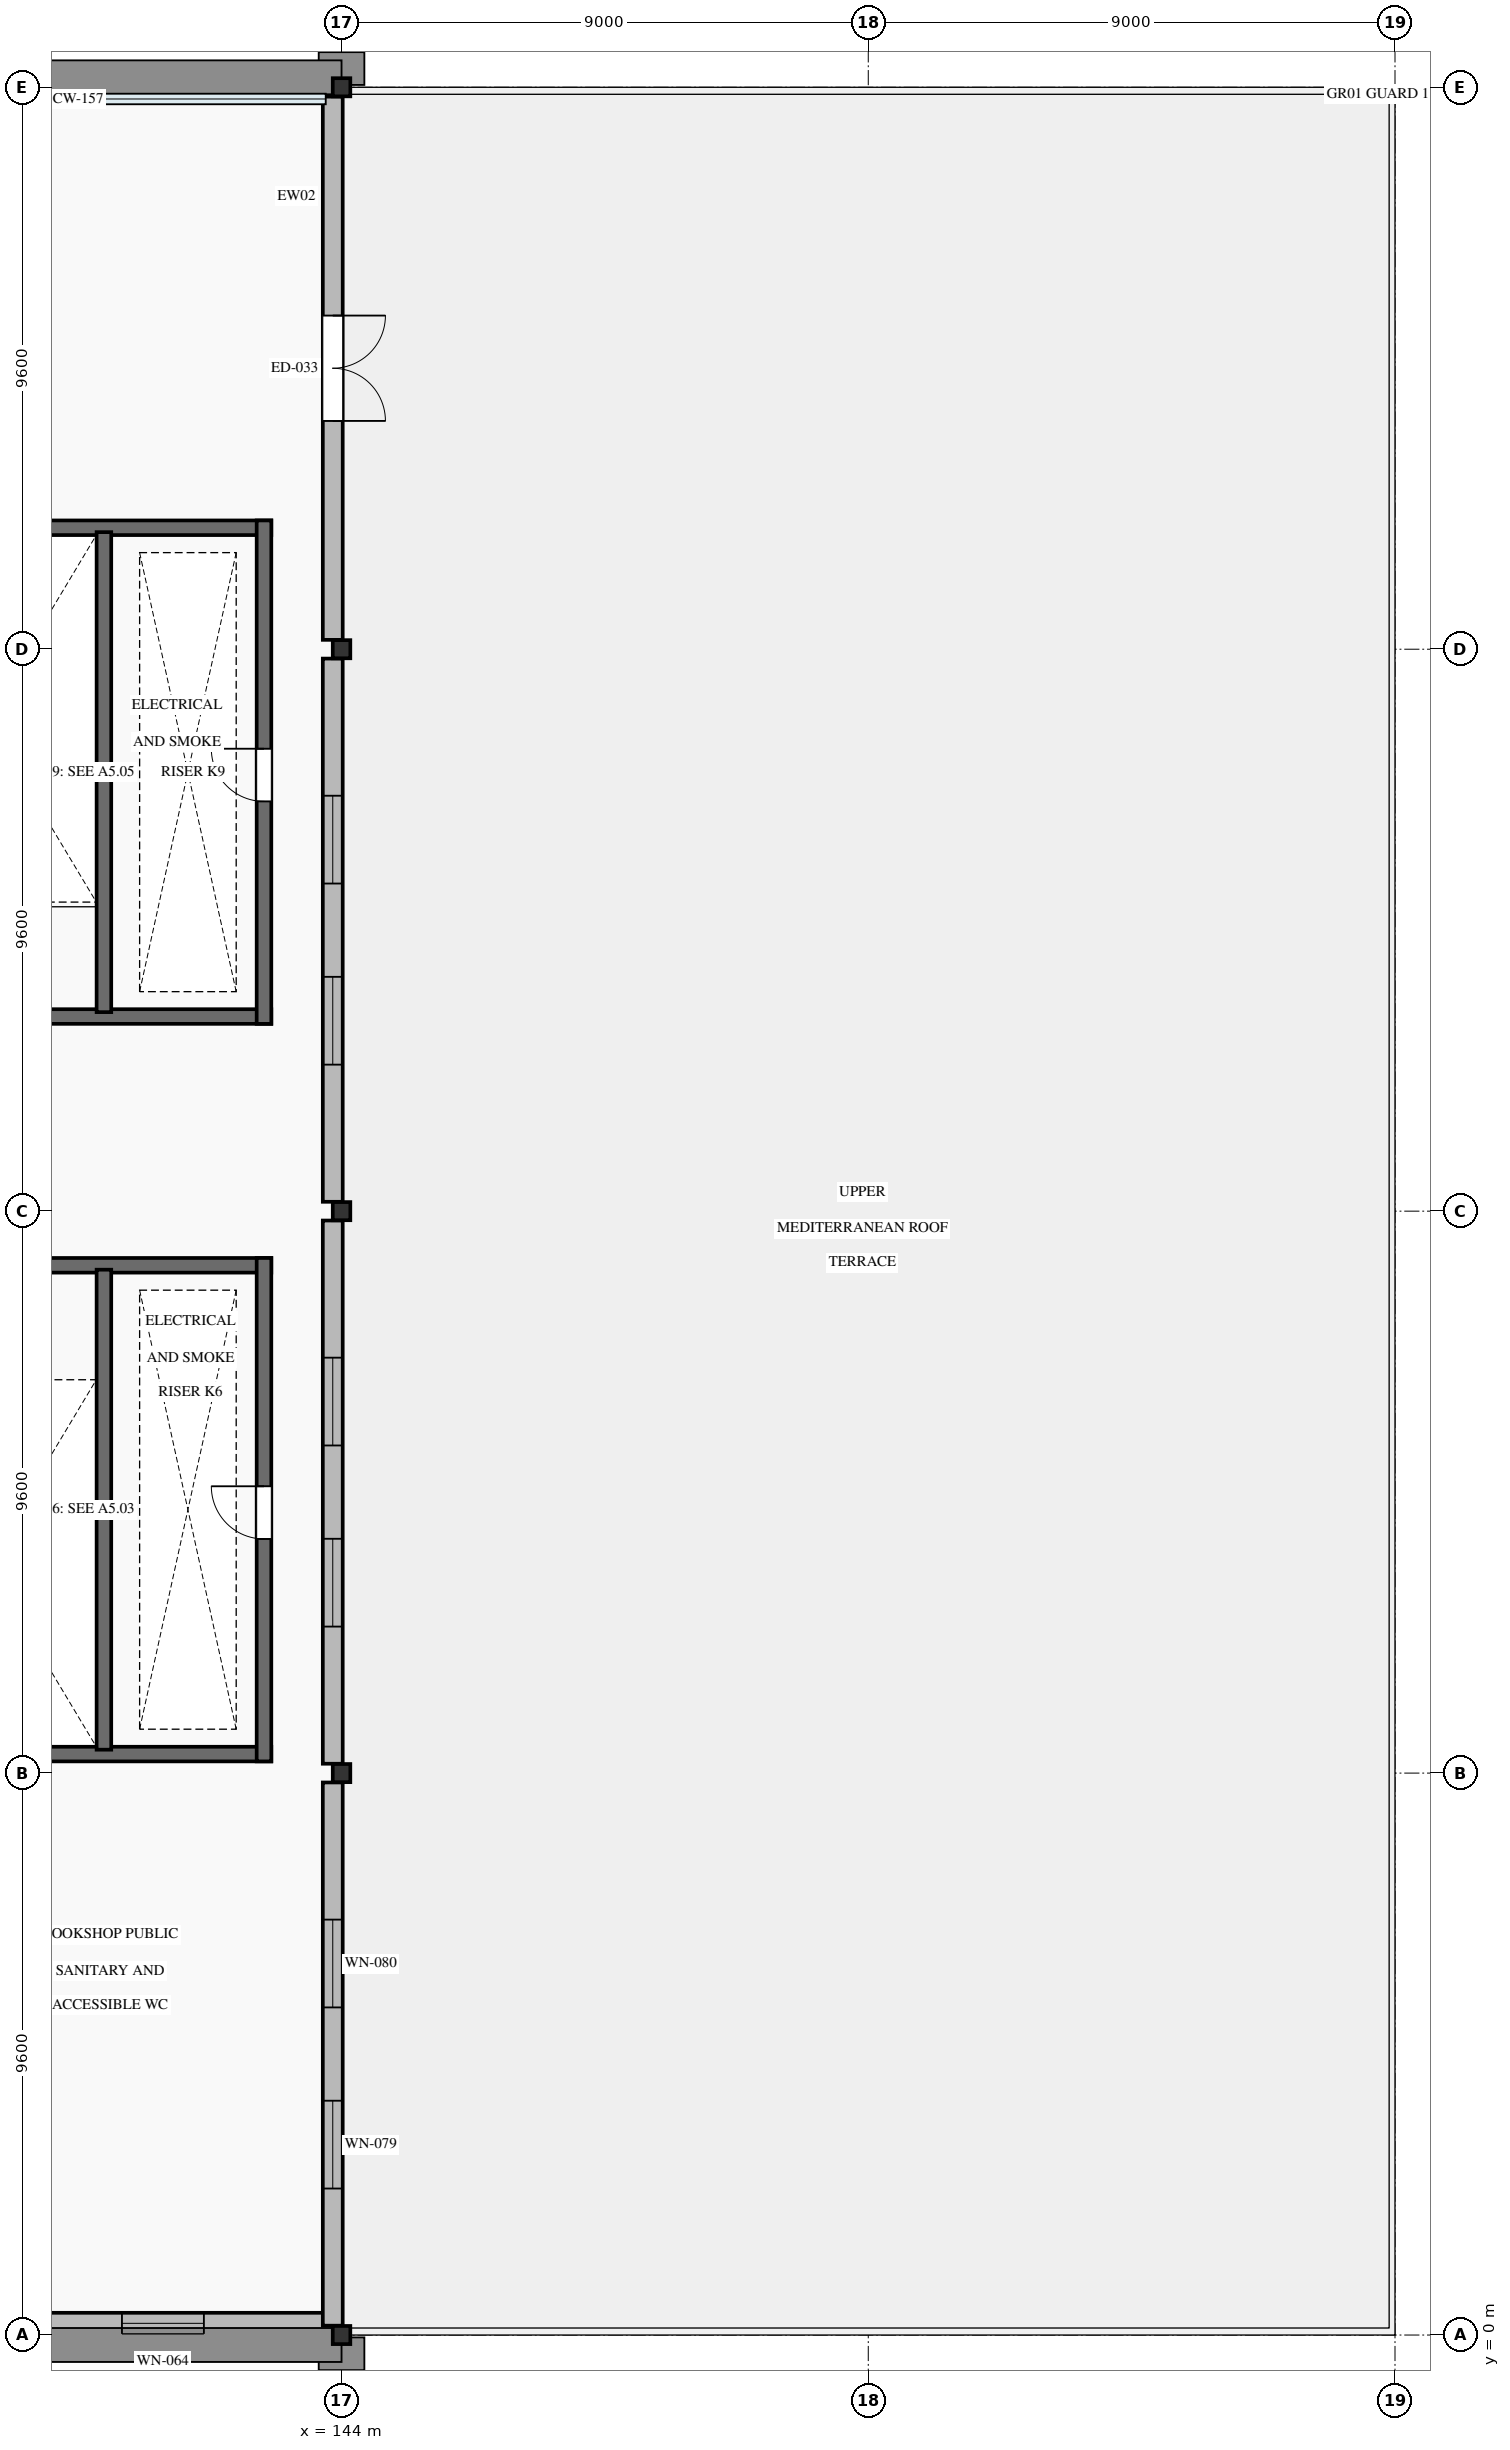
"""IFC4 building model, lengths in metres.
Left out: names, types, materials, properties, quantities, classifications, styles, units other than length and angle.
Written with IfcOpenShell. Run it as: python <this file> out.ifc"""

import sys

from ifc_helpers import new_model, si_unit, direction, frame, frame_2d, origin, origin_2d, place, context, subcontext, project, spatial, rectangle, i_section, extrude, element, fill, save


model = new_model("IFC4")
c1 = context("Model", 3, precision=1e-05, world=origin(), true_north=direction((0.0, 1.0)))
c2 = subcontext(c1, "Body", "Model", "MODEL_VIEW")
j1 = project(units=[si_unit("LENGTHUNIT", "METRE"), si_unit("PLANEANGLEUNIT", "RADIAN")], contexts=[c1])
p1 = place(None, origin())
s1 = spatial("IfcSite", under=j1, at=p1, CompositionType="ELEMENT")
p2 = place(p1, origin())
s2 = spatial("IfcBuilding", under=s1, at=p2, CompositionType="ELEMENT")
p3 = place(p2, frame((0.0, 0.0, 15.0)))
s3 = spatial("IfcBuildingStorey", under=s2, at=p3, CompositionType="ELEMENT", Elevation=15.0)
for number, where, z_axis, x_axis in (
    (1, (144.0, 0.0, 0.0), (0.0, 0.0, 1.0), (1.0, 0.0, 0.0)),
    (2, (144.0, 9.6, 0.0), (0.0, 0.0, 1.0), (1.0, 0.0, 0.0)),
    (3, (144.0, 19.2, 0.0), (0.0, 0.0, 1.0), (1.0, 0.0, 0.0)),
    (4, (144.0, 28.8, 0.0), (0.0, 0.0, 1.0), (1.0, 0.0, 0.0)),
    (5, (144.0, 38.4, 0.0), (0.0, 0.0, 1.0), (1.0, 0.0, 0.0)),
):
    element("IfcColumn", number, at=place(p3, frame(where, z_axis=z_axis, x_axis=x_axis)), inside=s3, PredefinedType="COLUMN", context=c2, shape_type="SweptSolid", body=[
        extrude(i_section(OverallWidth=0.3, OverallDepth=0.31, WebThickness=0.009, FlangeThickness=0.015, FilletRadius=0.027, at=origin_2d()), origin(), (0.0, 0.0, 1.0), 3.9),
    ])
p4 = place(p3, frame((135.155, 0.2, 0.0), z_axis=(0.0, 0.0, 1.0), x_axis=(1.0, 0.0, 0.0)))
e6 = element("IfcWall", 6, at=p4, inside=s3, PredefinedType="SOLIDWALL", context=c2, shape_type="SweptSolid", body=[
    extrude(rectangle(XDim=8.69, YDim=0.36, at=frame_2d((4.345, 0.0))), origin(), (0.0, 0.0, 1.0), 3.355),
])
p5 = place(p4, frame((2.197, 0.0, 0.95)))
e7 = element("IfcOpeningElement", 7, at=p5, cuts=e6, PredefinedType="OPENING", context=c2, shape_type="SweptSolid", body=[
    extrude(rectangle(XDim=1.4, YDim=2.0, at=frame_2d((0.7, 1.0))), frame((0.0, 0.195, 0.0), z_axis=(0.0, -1.0, 0.0), x_axis=(1.0, 0.0, 0.0)), (0.0, 0.0, 1.0), 0.39),
])
p6 = place(p4, frame((5.093, 0.0, 0.95)))
e8 = element("IfcOpeningElement", 8, at=p6, cuts=e6, PredefinedType="OPENING", context=c2, shape_type="SweptSolid", body=[
    extrude(rectangle(XDim=1.4, YDim=2.0, at=frame_2d((0.7, 1.0))), frame((0.0, 0.195, 0.0), z_axis=(0.0, -1.0, 0.0), x_axis=(1.0, 0.0, 0.0)), (0.0, 0.0, 1.0), 0.39),
])
p7 = place(p3, frame((143.85, 0.16, 0.0), z_axis=(0.0, 0.0, 1.0), x_axis=(0.0, 1.0, 0.0)))
e9 = element("IfcWall", 9, at=p7, inside=s3, PredefinedType="SOLIDWALL", context=c2, shape_type="SweptSolid", body=[
    extrude(rectangle(XDim=9.28, YDim=0.34, at=frame_2d((4.64, 0.0))), origin(), (0.0, 0.0, 1.0), 3.335),
])
p8 = place(p7, frame((2.343, 0.0, 0.95)))
e10 = element("IfcOpeningElement", 10, at=p8, cuts=e9, PredefinedType="OPENING", context=c2, shape_type="SweptSolid", body=[
    extrude(rectangle(XDim=1.5, YDim=2.1, at=frame_2d((0.75, 1.05))), frame((0.0, 0.185, 0.0), z_axis=(0.0, -1.0, 0.0), x_axis=(1.0, 0.0, 0.0)), (0.0, 0.0, 1.0), 0.37),
])
p9 = place(p7, frame((5.437, 0.0, 0.95)))
e11 = element("IfcOpeningElement", 11, at=p9, cuts=e9, PredefinedType="OPENING", context=c2, shape_type="SweptSolid", body=[
    extrude(rectangle(XDim=1.5, YDim=2.1, at=frame_2d((0.75, 1.05))), frame((0.0, 0.185, 0.0), z_axis=(0.0, -1.0, 0.0), x_axis=(1.0, 0.0, 0.0)), (0.0, 0.0, 1.0), 0.37),
])
p10 = place(p3, frame((143.85, 9.76, 0.0), z_axis=(0.0, 0.0, 1.0), x_axis=(0.0, 1.0, 0.0)))
e12 = element("IfcWall", 12, at=p10, inside=s3, PredefinedType="SOLIDWALL", context=c2, shape_type="SweptSolid", body=[
    extrude(rectangle(XDim=9.28, YDim=0.34, at=frame_2d((4.64, 0.0))), origin(), (0.0, 0.0, 1.0), 3.335),
])
p11 = place(p10, frame((2.343, 0.0, 0.95)))
e13 = element("IfcOpeningElement", 13, at=p11, cuts=e12, PredefinedType="OPENING", context=c2, shape_type="SweptSolid", body=[
    extrude(rectangle(XDim=1.5, YDim=2.1, at=frame_2d((0.75, 1.05))), frame((0.0, 0.185, 0.0), z_axis=(0.0, -1.0, 0.0), x_axis=(1.0, 0.0, 0.0)), (0.0, 0.0, 1.0), 0.37),
])
p12 = place(p10, frame((5.437, 0.0, 0.95)))
e14 = element("IfcOpeningElement", 14, at=p12, cuts=e12, PredefinedType="OPENING", context=c2, shape_type="SweptSolid", body=[
    extrude(rectangle(XDim=1.5, YDim=2.1, at=frame_2d((0.75, 1.05))), frame((0.0, 0.185, 0.0), z_axis=(0.0, -1.0, 0.0), x_axis=(1.0, 0.0, 0.0)), (0.0, 0.0, 1.0), 0.37),
])
p13 = place(p3, frame((143.85, 19.36, 0.0), z_axis=(0.0, 0.0, 1.0), x_axis=(0.0, 1.0, 0.0)))
e15 = element("IfcWall", 15, at=p13, inside=s3, PredefinedType="SOLIDWALL", context=c2, shape_type="SweptSolid", body=[
    extrude(rectangle(XDim=9.28, YDim=0.34, at=frame_2d((4.64, 0.0))), origin(), (0.0, 0.0, 1.0), 3.335),
])
p14 = place(p13, frame((2.343, 0.0, 0.95)))
e16 = element("IfcOpeningElement", 16, at=p14, cuts=e15, PredefinedType="OPENING", context=c2, shape_type="SweptSolid", body=[
    extrude(rectangle(XDim=1.5, YDim=2.1, at=frame_2d((0.75, 1.05))), frame((0.0, 0.185, 0.0), z_axis=(0.0, -1.0, 0.0), x_axis=(1.0, 0.0, 0.0)), (0.0, 0.0, 1.0), 0.37),
])
p15 = place(p13, frame((5.437, 0.0, 0.95)))
e17 = element("IfcOpeningElement", 17, at=p15, cuts=e15, PredefinedType="OPENING", context=c2, shape_type="SweptSolid", body=[
    extrude(rectangle(XDim=1.5, YDim=2.1, at=frame_2d((0.75, 1.05))), frame((0.0, 0.185, 0.0), z_axis=(0.0, -1.0, 0.0), x_axis=(1.0, 0.0, 0.0)), (0.0, 0.0, 1.0), 0.37),
])
p16 = place(p3, frame((143.85, 28.96, 0.0), z_axis=(0.0, 0.0, 1.0), x_axis=(0.0, 1.0, 0.0)))
e18 = element("IfcWall", 18, at=p16, inside=s3, PredefinedType="SOLIDWALL", context=c2, shape_type="SweptSolid", body=[
    extrude(rectangle(XDim=9.28, YDim=0.34, at=frame_2d((4.64, 0.0))), origin(), (0.0, 0.0, 1.0), 3.335),
])
p17 = place(p16, frame((3.74, 0.0, 0.0)))
e19 = element("IfcOpeningElement", 19, at=p17, cuts=e18, PredefinedType="OPENING", context=c2, shape_type="SweptSolid", body=[
    extrude(rectangle(XDim=1.8, YDim=2.3, at=frame_2d((0.9, 1.15))), frame((0.0, 0.185, 0.0), z_axis=(0.0, -1.0, 0.0), x_axis=(1.0, 0.0, 0.0)), (0.0, 0.0, 1.0), 0.37),
])
p18 = place(p3, frame((135.8, 9.925, 0.0), z_axis=(0.0, 0.0, 1.0), x_axis=(1.0, 0.0, 0.0)))
e20 = element("IfcWall", 20, at=p18, inside=s3, PredefinedType="SHEAR", context=c2, shape_type="SweptSolid", body=[
    extrude(rectangle(XDim=7.0, YDim=0.25, at=frame_2d((3.5, 0.0))), origin(), (0.0, 0.0, 1.0), 3.9),
])
p19 = place(p3, frame((135.8, 18.275, 0.0), z_axis=(0.0, 0.0, 1.0), x_axis=(1.0, 0.0, 0.0)))
e21 = element("IfcWall", 21, at=p19, inside=s3, PredefinedType="SHEAR", context=c2, shape_type="SweptSolid", body=[
    extrude(rectangle(XDim=7.0, YDim=0.25, at=frame_2d((3.5, 0.0))), origin(), (0.0, 0.0, 1.0), 3.9),
])
p20 = place(p19, frame((1.25, 0.0, 0.0)))
e22 = element("IfcOpeningElement", 22, at=p20, cuts=e21, PredefinedType="OPENING", context=c2, shape_type="SweptSolid", body=[
    extrude(rectangle(XDim=1.2, YDim=2.15, at=frame_2d((0.6, 1.075))), frame((0.0, 0.14, 0.0), z_axis=(0.0, -1.0, 0.0), x_axis=(1.0, 0.0, 0.0)), (0.0, 0.0, 1.0), 0.28),
])
p21 = place(p3, frame((142.675, 9.8, 0.0), z_axis=(0.0, 0.0, 1.0), x_axis=(0.0, 1.0, 0.0)))
e23 = element("IfcWall", 23, at=p21, inside=s3, PredefinedType="SHEAR", context=c2, shape_type="SweptSolid", body=[
    extrude(rectangle(XDim=8.6, YDim=0.25, at=frame_2d((4.3, 0.0))), origin(), (0.0, 0.0, 1.0), 3.9),
])
p22 = place(p21, frame((3.8, 0.0, 0.0)))
e24 = element("IfcOpeningElement", 24, at=p22, cuts=e23, PredefinedType="OPENING", context=c2, shape_type="SweptSolid", body=[
    extrude(rectangle(XDim=0.9, YDim=2.05, at=frame_2d((0.45, 1.025))), frame((0.0, 0.14, 0.0), z_axis=(0.0, -1.0, 0.0), x_axis=(1.0, 0.0, 0.0)), (0.0, 0.0, 1.0), 0.28),
])
p23 = place(p3, frame((139.94, 10.0, 0.0), z_axis=(0.0, 0.0, 1.0), x_axis=(0.0, 1.0, 0.0)))
e25 = element("IfcWall", 25, at=p23, inside=s3, PredefinedType="SHEAR", context=c2, shape_type="SweptSolid", body=[
    extrude(rectangle(XDim=8.2, YDim=0.25, at=frame_2d((4.1, 0.0))), origin(), (0.0, 0.0, 1.0), 3.9),
])
p24 = place(p3, frame((135.8, 22.525, 0.0), z_axis=(0.0, 0.0, 1.0), x_axis=(1.0, 0.0, 0.0)))
e26 = element("IfcWall", 26, at=p24, inside=s3, PredefinedType="SHEAR", context=c2, shape_type="SweptSolid", body=[
    extrude(rectangle(XDim=7.0, YDim=0.25, at=frame_2d((3.5, 0.0))), origin(), (0.0, 0.0, 1.0), 3.9),
])
p25 = place(p24, frame((1.25, 0.0, 0.0)))
e27 = element("IfcOpeningElement", 27, at=p25, cuts=e26, PredefinedType="OPENING", context=c2, shape_type="SweptSolid", body=[
    extrude(rectangle(XDim=1.2, YDim=2.15, at=frame_2d((0.6, 1.075))), frame((0.0, 0.14, 0.0), z_axis=(0.0, -1.0, 0.0), x_axis=(1.0, 0.0, 0.0)), (0.0, 0.0, 1.0), 0.28),
])
p26 = place(p3, frame((135.8, 30.875, 0.0), z_axis=(0.0, 0.0, 1.0), x_axis=(1.0, 0.0, 0.0)))
e28 = element("IfcWall", 28, at=p26, inside=s3, PredefinedType="SHEAR", context=c2, shape_type="SweptSolid", body=[
    extrude(rectangle(XDim=7.0, YDim=0.25, at=frame_2d((3.5, 0.0))), origin(), (0.0, 0.0, 1.0), 3.9),
])
p27 = place(p3, frame((142.675, 22.4, 0.0), z_axis=(0.0, 0.0, 1.0), x_axis=(0.0, 1.0, 0.0)))
e29 = element("IfcWall", 29, at=p27, inside=s3, PredefinedType="SHEAR", context=c2, shape_type="SweptSolid", body=[
    extrude(rectangle(XDim=8.6, YDim=0.25, at=frame_2d((4.3, 0.0))), origin(), (0.0, 0.0, 1.0), 3.9),
])
p28 = place(p27, frame((3.8, 0.0, 0.0)))
e30 = element("IfcOpeningElement", 30, at=p28, cuts=e29, PredefinedType="OPENING", context=c2, shape_type="SweptSolid", body=[
    extrude(rectangle(XDim=0.9, YDim=2.05, at=frame_2d((0.45, 1.025))), frame((0.0, 0.14, 0.0), z_axis=(0.0, -1.0, 0.0), x_axis=(1.0, 0.0, 0.0)), (0.0, 0.0, 1.0), 0.28),
])
p29 = place(p3, frame((139.94, 22.6, 0.0), z_axis=(0.0, 0.0, 1.0), x_axis=(0.0, 1.0, 0.0)))
e31 = element("IfcWall", 31, at=p29, inside=s3, PredefinedType="SHEAR", context=c2, shape_type="SweptSolid", body=[
    extrude(rectangle(XDim=8.2, YDim=0.25, at=frame_2d((4.1, 0.0))), origin(), (0.0, 0.0, 1.0), 3.9),
])
p30 = place(p6, origin())
e32 = element("IfcWindow", 32, at=p30, inside=s3, PartitioningType="SINGLE_PANEL", PredefinedType="WINDOW", context=c2, shape_type="SweptSolid", body=[
    extrude(rectangle(XDim=1.4, YDim=2.0, at=frame_2d((0.7, 1.0))), frame((0.0, 0.03, 0.0), z_axis=(0.0, -1.0, 0.0), x_axis=(1.0, 0.0, 0.0)), (0.0, 0.0, 1.0), 0.06),
])
fill(e8, e32)
p31 = place(p8, origin())
e33 = element("IfcWindow", 33, at=p31, inside=s3, PartitioningType="SINGLE_PANEL", PredefinedType="WINDOW", context=c2, shape_type="SweptSolid", body=[
    extrude(rectangle(XDim=1.5, YDim=2.1, at=frame_2d((0.75, 1.05))), frame((0.0, 0.03, 0.0), z_axis=(0.0, -1.0, 0.0), x_axis=(1.0, 0.0, 0.0)), (0.0, 0.0, 1.0), 0.06),
])
fill(e10, e33)
p32 = place(p9, origin())
e34 = element("IfcWindow", 34, at=p32, inside=s3, PartitioningType="SINGLE_PANEL", PredefinedType="WINDOW", context=c2, shape_type="SweptSolid", body=[
    extrude(rectangle(XDim=1.5, YDim=2.1, at=frame_2d((0.75, 1.05))), frame((0.0, 0.03, 0.0), z_axis=(0.0, -1.0, 0.0), x_axis=(1.0, 0.0, 0.0)), (0.0, 0.0, 1.0), 0.06),
])
fill(e11, e34)
p33 = place(p11, origin())
e35 = element("IfcWindow", 35, at=p33, inside=s3, PartitioningType="SINGLE_PANEL", PredefinedType="WINDOW", context=c2, shape_type="SweptSolid", body=[
    extrude(rectangle(XDim=1.5, YDim=2.1, at=frame_2d((0.75, 1.05))), frame((0.0, 0.03, 0.0), z_axis=(0.0, -1.0, 0.0), x_axis=(1.0, 0.0, 0.0)), (0.0, 0.0, 1.0), 0.06),
])
fill(e13, e35)
p34 = place(p12, origin())
e36 = element("IfcWindow", 36, at=p34, inside=s3, PartitioningType="SINGLE_PANEL", PredefinedType="WINDOW", context=c2, shape_type="SweptSolid", body=[
    extrude(rectangle(XDim=1.5, YDim=2.1, at=frame_2d((0.75, 1.05))), frame((0.0, 0.03, 0.0), z_axis=(0.0, -1.0, 0.0), x_axis=(1.0, 0.0, 0.0)), (0.0, 0.0, 1.0), 0.06),
])
fill(e14, e36)
p35 = place(p14, origin())
e37 = element("IfcWindow", 37, at=p35, inside=s3, PartitioningType="SINGLE_PANEL", PredefinedType="WINDOW", context=c2, shape_type="SweptSolid", body=[
    extrude(rectangle(XDim=1.5, YDim=2.1, at=frame_2d((0.75, 1.05))), frame((0.0, 0.03, 0.0), z_axis=(0.0, -1.0, 0.0), x_axis=(1.0, 0.0, 0.0)), (0.0, 0.0, 1.0), 0.06),
])
fill(e16, e37)
p36 = place(p15, origin())
e38 = element("IfcWindow", 38, at=p36, inside=s3, PartitioningType="SINGLE_PANEL", PredefinedType="WINDOW", context=c2, shape_type="SweptSolid", body=[
    extrude(rectangle(XDim=1.5, YDim=2.1, at=frame_2d((0.75, 1.05))), frame((0.0, 0.03, 0.0), z_axis=(0.0, -1.0, 0.0), x_axis=(1.0, 0.0, 0.0)), (0.0, 0.0, 1.0), 0.06),
])
fill(e17, e38)
p37 = place(p17, frame((1.8, 0.0, 0.0), z_axis=(0.0, 0.0, 1.0), x_axis=(-1.0, 0.0, 0.0)))
e39 = element("IfcDoor", 39, at=p37, inside=s3, OperationType="DOUBLE_DOOR_SINGLE_SWING", PredefinedType="DOOR", context=c2, shape_type="SweptSolid", body=[
    extrude(rectangle(XDim=1.8, YDim=2.3, at=frame_2d((0.9, 1.15))), frame((0.0, 0.025, 0.0), z_axis=(0.0, -1.0, 0.0), x_axis=(1.0, 0.0, 0.0)), (0.0, 0.0, 1.0), 0.05),
])
fill(e19, e39)
p38 = place(p22, origin())
e40 = element("IfcDoor", 40, at=p38, inside=s3, OperationType="SINGLE_SWING_RIGHT", PredefinedType="DOOR", context=c2, shape_type="SweptSolid", body=[
    extrude(rectangle(XDim=0.9, YDim=2.05, at=frame_2d((0.45, 1.025))), frame((0.0, 0.025, 0.0), z_axis=(0.0, -1.0, 0.0), x_axis=(1.0, 0.0, 0.0)), (0.0, 0.0, 1.0), 0.05),
])
fill(e24, e40)
p39 = place(p28, origin())
e41 = element("IfcDoor", 41, at=p39, inside=s3, OperationType="SINGLE_SWING_RIGHT", PredefinedType="DOOR", context=c2, shape_type="SweptSolid", body=[
    extrude(rectangle(XDim=0.9, YDim=2.05, at=frame_2d((0.45, 1.025))), frame((0.0, 0.025, 0.0), z_axis=(0.0, -1.0, 0.0), x_axis=(1.0, 0.0, 0.0)), (0.0, 0.0, 1.0), 0.05),
])
fill(e30, e41)
save(model, sys.argv[1])
